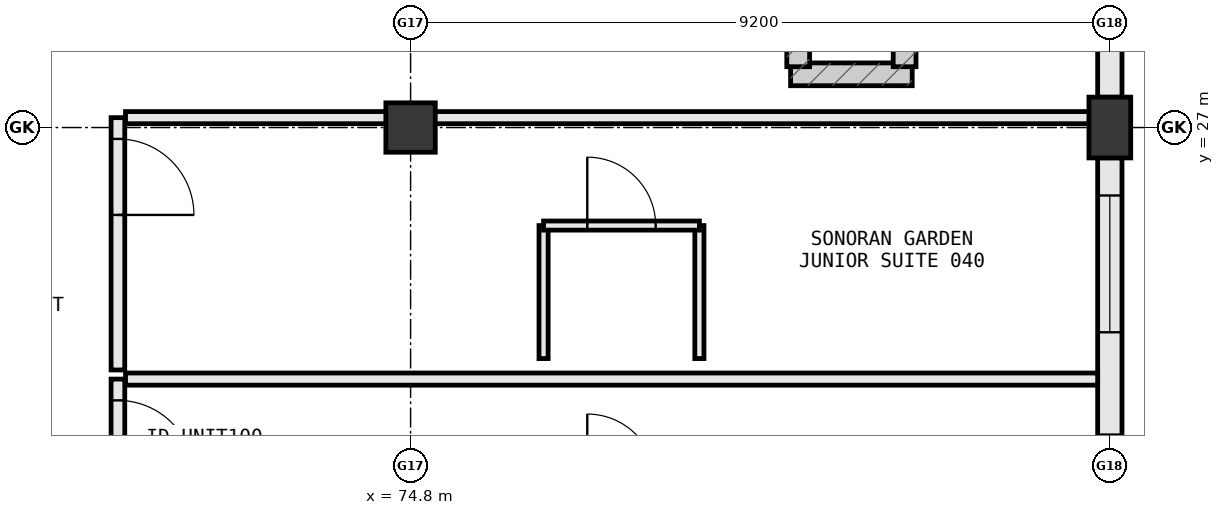
"""IFC4 building model, lengths in metres.
Left out: names, types, materials, properties, quantities, classifications, styles, units other than length and angle.
Written with IfcOpenShell. Run it as: python <this file> out.ifc"""

import sys

from ifc_helpers import new_model, si_unit, direction, frame, frame_2d, origin, origin_2d, place, context, subcontext, project, spatial, rectangle, extrude, element, fill, save


model = new_model("IFC4")
c1 = context("Model", 3, precision=1e-05, world=origin(), true_north=direction((0.0, 1.0)))
c2 = subcontext(c1, "Body", "Model", "MODEL_VIEW")
j1 = project(units=[si_unit("LENGTHUNIT", "METRE"), si_unit("PLANEANGLEUNIT", "RADIAN")], contexts=[c1])
p1 = place(None, origin())
s1 = spatial("IfcSite", under=j1, at=p1, CompositionType="ELEMENT")
p2 = place(p1, origin())
s2 = spatial("IfcBuilding", under=s1, at=p2, CompositionType="ELEMENT")
p3 = place(p2, frame((0.0, 0.0, 10.8)))
s3 = spatial("IfcBuildingStorey", under=s2, at=p3, CompositionType="ELEMENT", Elevation=10.8)
p4 = place(p3, frame((74.8, 27.0, 0.0), z_axis=(0.0, 0.0, 1.0), x_axis=(1.0, 0.0, 0.0)))
e1 = element("IfcColumn", 1, at=p4, inside=s3, PredefinedType="COLUMN", context=c2, shape_type="SweptSolid", body=[
    extrude(rectangle(XDim=0.65, YDim=0.65, at=origin_2d()), origin(), (0.0, 0.0, 1.0), 5.4),
])
p5 = place(p3, frame((84.0, 27.0, 0.0), z_axis=(0.0, 0.0, 1.0), x_axis=(1.0, 0.0, 0.0)))
e2 = element("IfcColumn", 2, at=p5, inside=s3, PredefinedType="PILASTER", context=c2, shape_type="SweptSolid", body=[
    extrude(rectangle(XDim=0.55, YDim=0.8, at=origin_2d()), origin(), (0.0, 0.0, 1.0), 5.4),
])
p6 = place(p3, frame((79.8, 27.7, 0.0), z_axis=(0.0, 0.0, 1.0), x_axis=(1.0, 0.0, 0.0)))
e3 = element("IfcWall", 3, at=p6, inside=s3, PredefinedType="SHEAR", context=c2, shape_type="SweptSolid", body=[
    extrude(rectangle(XDim=1.6, YDim=0.3, at=frame_2d((0.8, 0.0))), origin(), (0.0, 0.0, 1.0), 4.8),
])
for number, where, z_axis, x_axis in (
    (4, (79.9, 29.0, 0.0), (0.0, 0.0, 1.0), (0.0, -1.0, 0.0)),
    (5, (81.3, 27.8, 0.0), (0.0, 0.0, 1.0), (0.0, 1.0, 0.0)),
):
    element("IfcWall", number, at=place(p3, frame(where, z_axis=z_axis, x_axis=x_axis)), inside=s3, PredefinedType="SHEAR", context=c2, shape_type="SweptSolid", body=[
        extrude(rectangle(XDim=1.2, YDim=0.3, at=frame_2d((0.6, 0.0))), origin(), (0.0, 0.0, 1.0), 4.8),
    ])
p7 = place(p3, frame((84.0, 18.998, 0.0), z_axis=(0.0, 0.0, 1.0), x_axis=(0.0, 1.0, 0.0)))
e6 = element("IfcWall", 6, at=p7, inside=s3, PredefinedType="STANDARD", context=c2, shape_type="SweptSolid", body=[
    extrude(rectangle(XDim=7.604, YDim=0.32, at=frame_2d((3.802, 0.0))), origin(), (0.0, 0.0, 1.0), 4.332),
])
p8 = place(p7, frame((0.206, 0.0, 0.85)))
e7 = element("IfcOpeningElement", 7, at=p8, cuts=e6, PredefinedType="OPENING", context=c2, shape_type="SweptSolid", body=[
    extrude(rectangle(XDim=0.9, YDim=1.4, at=frame_2d((0.45, 0.7))), frame((0.0, 0.172, 0.0), z_axis=(0.0, -1.0, 0.0), x_axis=(1.0, 0.0, 0.0)), (0.0, 0.0, 1.0), 0.344),
])
p9 = place(p7, frame((2.162, 0.0, 0.85)))
e8 = element("IfcOpeningElement", 8, at=p9, cuts=e6, PredefinedType="OPENING", context=c2, shape_type="SweptSolid", body=[
    extrude(rectangle(XDim=1.8, YDim=1.85, at=frame_2d((0.9, 0.925))), frame((0.0, 0.172, 0.0), z_axis=(0.0, -1.0, 0.0), x_axis=(1.0, 0.0, 0.0)), (0.0, 0.0, 1.0), 0.344),
])
p10 = place(p7, frame((5.308, 0.0, 0.85)))
e9 = element("IfcOpeningElement", 9, at=p10, cuts=e6, PredefinedType="OPENING", context=c2, shape_type="SweptSolid", body=[
    extrude(rectangle(XDim=1.8, YDim=1.85, at=frame_2d((0.9, 0.925))), frame((0.0, 0.172, 0.0), z_axis=(0.0, -1.0, 0.0), x_axis=(1.0, 0.0, 0.0)), (0.0, 0.0, 1.0), 0.344),
])
p11 = place(p3, frame((84.0, 27.398, 0.0), z_axis=(0.0, 0.0, 1.0), x_axis=(0.0, 1.0, 0.0)))
e10 = element("IfcWall", 10, at=p11, inside=s3, PredefinedType="STANDARD", context=c2, shape_type="SweptSolid", body=[
    extrude(rectangle(XDim=8.604, YDim=0.32, at=frame_2d((4.302, 0.0))), origin(), (0.0, 0.0, 1.0), 4.332),
])
p12 = place(p11, frame((3.327, 0.0, 0.85)))
e11 = element("IfcOpeningElement", 11, at=p12, cuts=e10, PredefinedType="OPENING", context=c2, shape_type="SweptSolid", body=[
    extrude(rectangle(XDim=1.95, YDim=1.9, at=frame_2d((0.975, 0.95))), frame((0.0, 0.172, 0.0), z_axis=(0.0, -1.0, 0.0), x_axis=(1.0, 0.0, 0.0)), (0.0, 0.0, 1.0), 0.344),
])
p13 = place(p3, frame((70.95, 23.69, 0.0), z_axis=(0.0, 0.0, 1.0), x_axis=(0.0, -1.0, 0.0)))
e12 = element("IfcWall", 12, at=p13, inside=s3, PredefinedType="PARTITIONING", context=c2, shape_type="SweptSolid", body=[
    extrude(rectangle(XDim=3.26, YDim=0.18, at=frame_2d((1.63, 0.0))), origin(), (0.0, 0.0, 1.0), 4.8),
])
p14 = place(p13, frame((0.28, 0.0, 0.0)))
e13 = element("IfcOpeningElement", 13, at=p14, cuts=e12, PredefinedType="OPENING", context=c2, shape_type="SweptSolid", body=[
    extrude(rectangle(XDim=1.0, YDim=2.2, at=frame_2d((0.5, 1.1))), frame((0.0, 0.102, 0.0), z_axis=(0.0, -1.0, 0.0), x_axis=(1.0, 0.0, 0.0)), (0.0, 0.0, 1.0), 0.204),
])
p15 = place(p3, frame((71.05, 23.69, 0.0), z_axis=(0.0, 0.0, 1.0), x_axis=(1.0, 0.0, 0.0)))
e14 = element("IfcWall", 14, at=p15, inside=s3, PredefinedType="PARTITIONING", context=c2, shape_type="SweptSolid", body=[
    extrude(rectangle(XDim=12.79, YDim=0.16, at=frame_2d((6.395, 0.0))), origin(), (0.0, 0.0, 1.0), 4.8),
])
p16 = place(p3, frame((70.95, 27.13, 0.0), z_axis=(0.0, 0.0, 1.0), x_axis=(0.0, -1.0, 0.0)))
e15 = element("IfcWall", 15, at=p16, inside=s3, PredefinedType="PARTITIONING", context=c2, shape_type="SweptSolid", body=[
    extrude(rectangle(XDim=3.32, YDim=0.18, at=frame_2d((1.66, 0.0))), origin(), (0.0, 0.0, 1.0), 4.8),
])
p17 = place(p16, frame((0.28, 0.0, 0.0)))
e16 = element("IfcOpeningElement", 16, at=p17, cuts=e15, PredefinedType="OPENING", context=c2, shape_type="SweptSolid", body=[
    extrude(rectangle(XDim=1.0, YDim=2.2, at=frame_2d((0.5, 1.1))), frame((0.0, 0.102, 0.0), z_axis=(0.0, -1.0, 0.0), x_axis=(1.0, 0.0, 0.0)), (0.0, 0.0, 1.0), 0.204),
])
p18 = place(p3, frame((71.05, 27.13, 0.0), z_axis=(0.0, 0.0, 1.0), x_axis=(1.0, 0.0, 0.0)))
e17 = element("IfcWall", 17, at=p18, inside=s3, PredefinedType="PARTITIONING", context=c2, shape_type="SweptSolid", body=[
    extrude(rectangle(XDim=12.79, YDim=0.16, at=frame_2d((6.395, 0.0))), origin(), (0.0, 0.0, 1.0), 4.175),
])
for number, where, z_axis, x_axis in (
    (18, (76.55, 23.96, 0.0), (0.0, 0.0, 1.0), (0.0, 1.0, 0.0)),
    (19, (78.6, 23.96, 0.0), (0.0, 0.0, 1.0), (0.0, 1.0, 0.0)),
):
    element("IfcWall", number, at=place(p3, frame(where, z_axis=z_axis, x_axis=x_axis)), inside=s3, PredefinedType="PARTITIONING", context=c2, shape_type="SweptSolid", body=[
        extrude(rectangle(XDim=1.75, YDim=0.12, at=frame_2d((0.875, 0.0))), origin(), (0.0, 0.0, 1.0), 4.8),
    ])
p19 = place(p3, frame((76.55, 25.71, 0.0), z_axis=(0.0, 0.0, 1.0), x_axis=(1.0, 0.0, 0.0)))
e20 = element("IfcWall", 20, at=p19, inside=s3, PredefinedType="PARTITIONING", context=c2, shape_type="SweptSolid", body=[
    extrude(rectangle(XDim=2.05, YDim=0.12, at=frame_2d((1.025, 0.0))), origin(), (0.0, 0.0, 1.0), 4.8),
])
p20 = place(p19, frame((0.575, 0.0, 0.0)))
e21 = element("IfcOpeningElement", 21, at=p20, cuts=e20, PredefinedType="OPENING", context=c2, shape_type="SweptSolid", body=[
    extrude(rectangle(XDim=0.9, YDim=2.15, at=frame_2d((0.45, 1.075))), frame((0.0, 0.072, 0.0), z_axis=(0.0, -1.0, 0.0), x_axis=(1.0, 0.0, 0.0)), (0.0, 0.0, 1.0), 0.144),
])
p21 = place(p9, origin())
e22 = element("IfcWindow", 22, at=p21, inside=s3, PartitioningType="SINGLE_PANEL", PredefinedType="WINDOW", context=c2, shape_type="SweptSolid", body=[
    extrude(rectangle(XDim=1.8, YDim=1.85, at=frame_2d((0.9, 0.925))), frame((0.0, 0.03, 0.0), z_axis=(0.0, -1.0, 0.0), x_axis=(1.0, 0.0, 0.0)), (0.0, 0.0, 1.0), 0.06),
])
fill(e8, e22)
p22 = place(p10, origin())
e23 = element("IfcWindow", 23, at=p22, inside=s3, PartitioningType="SINGLE_PANEL", PredefinedType="WINDOW", context=c2, shape_type="SweptSolid", body=[
    extrude(rectangle(XDim=1.8, YDim=1.85, at=frame_2d((0.9, 0.925))), frame((0.0, 0.03, 0.0), z_axis=(0.0, -1.0, 0.0), x_axis=(1.0, 0.0, 0.0)), (0.0, 0.0, 1.0), 0.06),
])
fill(e9, e23)
p23 = place(p14, origin())
e24 = element("IfcDoor", 24, at=p23, inside=s3, OperationType="SINGLE_SWING_RIGHT", PredefinedType="DOOR", context=c2, shape_type="SweptSolid", body=[
    extrude(rectangle(XDim=1.0, YDim=2.2, at=frame_2d((0.5, 1.1))), frame((0.0, 0.025, 0.0), z_axis=(0.0, -1.0, 0.0), x_axis=(1.0, 0.0, 0.0)), (0.0, 0.0, 1.0), 0.05),
])
fill(e13, e24)
p24 = place(p17, origin())
e25 = element("IfcDoor", 25, at=p24, inside=s3, OperationType="SINGLE_SWING_RIGHT", PredefinedType="DOOR", context=c2, shape_type="SweptSolid", body=[
    extrude(rectangle(XDim=1.0, YDim=2.2, at=frame_2d((0.5, 1.1))), frame((0.0, 0.025, 0.0), z_axis=(0.0, -1.0, 0.0), x_axis=(1.0, 0.0, 0.0)), (0.0, 0.0, 1.0), 0.05),
])
fill(e16, e25)
p25 = place(p20, origin())
e26 = element("IfcDoor", 26, at=p25, inside=s3, OperationType="SINGLE_SWING_LEFT", PredefinedType="DOOR", context=c2, shape_type="SweptSolid", body=[
    extrude(rectangle(XDim=0.9, YDim=2.15, at=frame_2d((0.45, 1.075))), frame((0.0, 0.025, 0.0), z_axis=(0.0, -1.0, 0.0), x_axis=(1.0, 0.0, 0.0)), (0.0, 0.0, 1.0), 0.05),
])
fill(e21, e26)
save(model, sys.argv[1])
